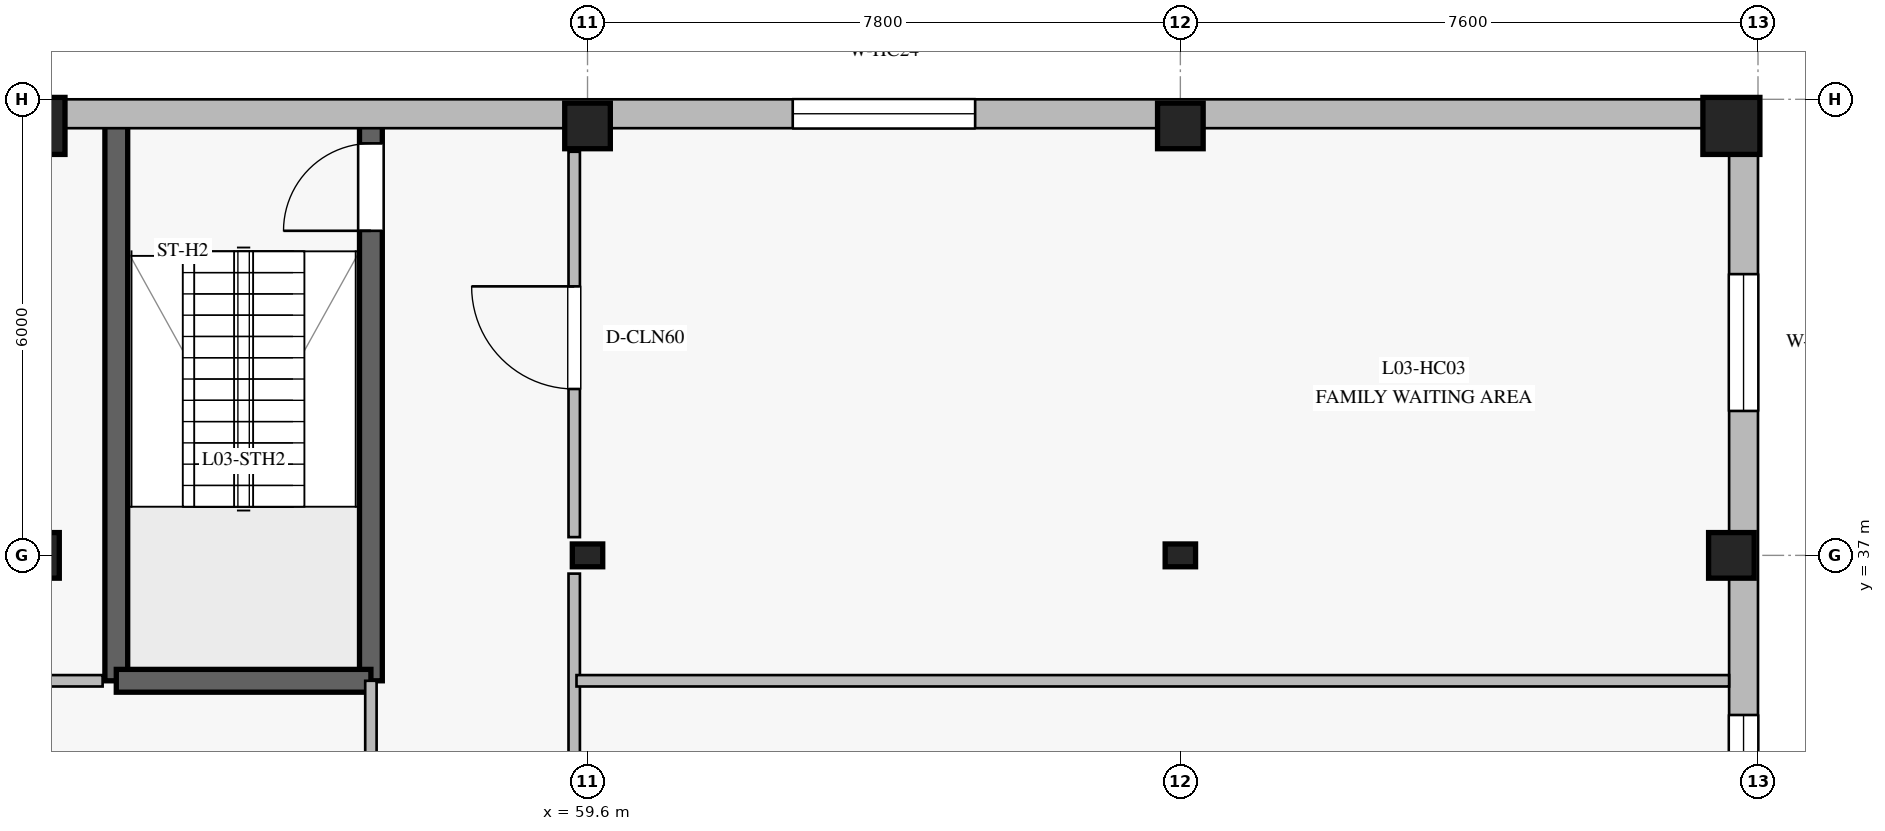
"""IFC4 building model, lengths in metres.
Left out: names, types, materials, properties, quantities, classifications, styles, units other than length and angle.
Written with IfcOpenShell. Run it as: python <this file> out.ifc"""

import sys

from ifc_helpers import new_model, si_unit, direction, frame, frame_2d, origin, origin_2d, place, context, subcontext, project, spatial, rectangle, i_section, extrude, element, fill, save


model = new_model("IFC4")
c1 = context("Model", 3, precision=1e-05, world=origin(), true_north=direction((0.0, 1.0)))
c2 = subcontext(c1, "Body", "Model", "MODEL_VIEW")
j1 = project(units=[si_unit("LENGTHUNIT", "METRE"), si_unit("PLANEANGLEUNIT", "RADIAN")], contexts=[c1])
p1 = place(None, origin())
s1 = spatial("IfcSite", under=j1, at=p1, CompositionType="ELEMENT")
p2 = place(p1, origin())
s2 = spatial("IfcBuilding", under=s1, at=p2, CompositionType="ELEMENT")
p3 = place(p2, frame((0.0, 0.0, 14.4)))
s3 = spatial("IfcBuildingStorey", under=s2, at=p3, CompositionType="ELEMENT", Elevation=14.4)
p4 = place(p3, frame((56.75, 35.35, 0.0), z_axis=(0.0, 0.0, 1.0), x_axis=(0.0, 1.0, 0.0)))
e1 = element("IfcWall", 1, at=p4, inside=s3, PredefinedType="SOLIDWALL", context=c2, shape_type="SweptSolid", body=[
    extrude(rectangle(XDim=7.3, YDim=0.3, at=frame_2d((3.65, 0.0))), origin(), (0.0, 0.0, 1.0), 4.3),
])
p5 = place(p4, frame((5.92, 0.0, 0.0)))
e2 = element("IfcOpeningElement", 2, at=p5, cuts=e1, PredefinedType="OPENING", context=c2, shape_type="SweptSolid", body=[
    extrude(rectangle(XDim=1.15, YDim=2.2, at=frame_2d((0.575, 1.1))), frame((0.0, 0.16, 0.0), z_axis=(0.0, -1.0, 0.0), x_axis=(1.0, 0.0, 0.0)), (0.0, 0.0, 1.0), 0.32),
])
p6 = place(p3, frame((53.4, 35.35, 0.0), z_axis=(0.0, 0.0, 1.0), x_axis=(0.0, 1.0, 0.0)))
e3 = element("IfcWall", 3, at=p6, inside=s3, PredefinedType="SOLIDWALL", context=c2, shape_type="SweptSolid", body=[
    extrude(rectangle(XDim=7.3, YDim=0.3, at=frame_2d((3.65, 0.0))), origin(), (0.0, 0.0, 1.0), 4.3),
])
p7 = place(p3, frame((53.4, 35.35, 0.0), z_axis=(0.0, 0.0, 1.0), x_axis=(1.0, 0.0, 0.0)))
e4 = element("IfcWall", 4, at=p7, inside=s3, PredefinedType="SOLIDWALL", context=c2, shape_type="SweptSolid", body=[
    extrude(rectangle(XDim=3.35, YDim=0.3, at=frame_2d((1.675, 0.0))), origin(), (0.0, 0.0, 1.0), 4.3),
])
p8 = place(p3, frame((52.35, 37.0, 0.0), z_axis=(0.0, 0.0, 1.0), x_axis=(1.0, 0.0, 0.0)))
e5 = element("IfcColumn", 5, at=p8, inside=s3, PredefinedType="COLUMN", context=c2, shape_type="SweptSolid", body=[
    extrude(rectangle(XDim=0.6, YDim=0.6, at=origin_2d()), origin(), (0.0, 0.0, 1.0), 4.6),
])
p9 = place(p3, frame((52.35, 42.65, 0.0), z_axis=(0.0, 0.0, 1.0), x_axis=(1.0, 0.0, 0.0)))
e6 = element("IfcColumn", 6, at=p9, inside=s3, PredefinedType="COLUMN", context=c2, shape_type="SweptSolid", body=[
    extrude(rectangle(XDim=0.75, YDim=0.75, at=origin_2d()), origin(), (0.0, 0.0, 1.0), 4.6),
])
p10 = place(p3, frame((59.6, 37.0, 0.0), z_axis=(0.0, 0.0, 1.0), x_axis=(1.0, 0.0, 0.0)))
e7 = element("IfcColumn", 7, at=p10, inside=s3, PredefinedType="COLUMN", context=c2, shape_type="SweptSolid", body=[
    extrude(i_section(OverallWidth=0.3, OverallDepth=0.4, WebThickness=0.013, FlangeThickness=0.024, at=origin_2d()), origin(), (0.0, 0.0, 1.0), 4.6),
])
p11 = place(p3, frame((59.6, 42.65, 0.0), z_axis=(0.0, 0.0, 1.0), x_axis=(1.0, 0.0, 0.0)))
e8 = element("IfcColumn", 8, at=p11, inside=s3, PredefinedType="COLUMN", context=c2, shape_type="SweptSolid", body=[
    extrude(rectangle(XDim=0.6, YDim=0.6, at=origin_2d()), origin(), (0.0, 0.0, 1.0), 4.6),
])
p12 = place(p3, frame((67.4, 37.0, 0.0), z_axis=(0.0, 0.0, 1.0), x_axis=(1.0, 0.0, 0.0)))
e9 = element("IfcColumn", 9, at=p12, inside=s3, PredefinedType="COLUMN", context=c2, shape_type="SweptSolid", body=[
    extrude(i_section(OverallWidth=0.3, OverallDepth=0.4, WebThickness=0.013, FlangeThickness=0.024, at=origin_2d()), origin(), (0.0, 0.0, 1.0), 4.6),
])
for number, where, z_axis, x_axis in (
    (10, (67.4, 42.65, 0.0), (0.0, 0.0, 1.0), (1.0, 0.0, 0.0)),
    (11, (74.65, 37.0, 0.0), (0.0, 0.0, 1.0), (1.0, 0.0, 0.0)),
):
    element("IfcColumn", number, at=place(p3, frame(where, z_axis=z_axis, x_axis=x_axis)), inside=s3, PredefinedType="COLUMN", context=c2, shape_type="SweptSolid", body=[
        extrude(rectangle(XDim=0.6, YDim=0.6, at=origin_2d()), origin(), (0.0, 0.0, 1.0), 4.6),
    ])
p13 = place(p3, frame((74.65, 42.65, 0.0), z_axis=(0.0, 0.0, 1.0), x_axis=(1.0, 0.0, 0.0)))
e12 = element("IfcColumn", 12, at=p13, inside=s3, PredefinedType="COLUMN", context=c2, shape_type="SweptSolid", body=[
    extrude(rectangle(XDim=0.75, YDim=0.75, at=origin_2d()), origin(), (0.0, 0.0, 1.0), 4.6),
])
p14 = place(p3, frame((52.0, 42.81, 0.0), z_axis=(0.0, 0.0, 1.0), x_axis=(1.0, 0.0, 0.0)))
e13 = element("IfcWall", 13, at=p14, inside=s3, PredefinedType="STANDARD", context=c2, shape_type="SweptSolid", body=[
    extrude(rectangle(XDim=23.0, YDim=0.38, at=frame_2d((11.5, 0.0))), origin(), (0.0, 0.0, 1.0), 4.3),
])
p15 = place(p14, frame((10.3, 0.0, 0.95)))
e14 = element("IfcOpeningElement", 14, at=p15, cuts=e13, PredefinedType="OPENING", context=c2, shape_type="SweptSolid", body=[
    extrude(rectangle(XDim=2.4, YDim=1.8, at=frame_2d((1.2, 0.9))), frame((0.0, 0.2, 0.0), z_axis=(0.0, -1.0, 0.0), x_axis=(1.0, 0.0, 0.0)), (0.0, 0.0, 1.0), 0.4),
])
p16 = place(p3, frame((74.81, 42.62, 0.0), z_axis=(0.0, 0.0, 1.0), x_axis=(0.0, -1.0, 0.0)))
e15 = element("IfcWall", 15, at=p16, inside=s3, PredefinedType="STANDARD", context=c2, shape_type="SweptSolid", body=[
    extrude(rectangle(XDim=35.24, YDim=0.38, at=frame_2d((17.62, 0.0))), origin(), (0.0, 0.0, 1.0), 4.3),
])
p17 = place(p16, frame((31.52, 0.0, 0.9)))
e16 = element("IfcOpeningElement", 16, at=p17, cuts=e15, PredefinedType="OPENING", context=c2, shape_type="SweptSolid", body=[
    extrude(rectangle(XDim=1.8, YDim=1.8, at=frame_2d((0.9, 0.9))), frame((0.0, 0.2, 0.0), z_axis=(0.0, -1.0, 0.0), x_axis=(1.0, 0.0, 0.0)), (0.0, 0.0, 1.0), 0.4),
])
p18 = place(p16, frame((25.72, 0.0, 0.9)))
e17 = element("IfcOpeningElement", 17, at=p18, cuts=e15, PredefinedType="OPENING", context=c2, shape_type="SweptSolid", body=[
    extrude(rectangle(XDim=1.8, YDim=1.8, at=frame_2d((0.9, 0.9))), frame((0.0, 0.2, 0.0), z_axis=(0.0, -1.0, 0.0), x_axis=(1.0, 0.0, 0.0)), (0.0, 0.0, 1.0), 0.4),
])
p19 = place(p16, frame((19.72, 0.0, 0.9)))
e18 = element("IfcOpeningElement", 18, at=p19, cuts=e15, PredefinedType="OPENING", context=c2, shape_type="SweptSolid", body=[
    extrude(rectangle(XDim=1.8, YDim=1.8, at=frame_2d((0.9, 0.9))), frame((0.0, 0.2, 0.0), z_axis=(0.0, -1.0, 0.0), x_axis=(1.0, 0.0, 0.0)), (0.0, 0.0, 1.0), 0.4),
])
p20 = place(p16, frame((13.72, 0.0, 0.9)))
e19 = element("IfcOpeningElement", 19, at=p20, cuts=e15, PredefinedType="OPENING", context=c2, shape_type="SweptSolid", body=[
    extrude(rectangle(XDim=1.8, YDim=1.8, at=frame_2d((0.9, 0.9))), frame((0.0, 0.2, 0.0), z_axis=(0.0, -1.0, 0.0), x_axis=(1.0, 0.0, 0.0)), (0.0, 0.0, 1.0), 0.4),
])
p21 = place(p16, frame((7.72, 0.0, 0.9)))
e20 = element("IfcOpeningElement", 20, at=p21, cuts=e15, PredefinedType="OPENING", context=c2, shape_type="SweptSolid", body=[
    extrude(rectangle(XDim=1.8, YDim=1.8, at=frame_2d((0.9, 0.9))), frame((0.0, 0.2, 0.0), z_axis=(0.0, -1.0, 0.0), x_axis=(1.0, 0.0, 0.0)), (0.0, 0.0, 1.0), 0.4),
])
p22 = place(p16, frame((1.92, 0.0, 0.9)))
e21 = element("IfcOpeningElement", 21, at=p22, cuts=e15, PredefinedType="OPENING", context=c2, shape_type="SweptSolid", body=[
    extrude(rectangle(XDim=1.8, YDim=1.8, at=frame_2d((0.9, 0.9))), frame((0.0, 0.2, 0.0), z_axis=(0.0, -1.0, 0.0), x_axis=(1.0, 0.0, 0.0)), (0.0, 0.0, 1.0), 0.4),
])
p23 = place(p3, frame((56.75, 14.65, 0.0), z_axis=(0.0, 0.0, 1.0), x_axis=(0.0, 1.0, 0.0)))
e22 = element("IfcWall", 22, at=p23, inside=s3, PredefinedType="PARTITIONING", context=c2, shape_type="SweptSolid", body=[
    extrude(rectangle(XDim=20.7, YDim=0.15, at=frame_2d((10.35, 0.0))), origin(), (0.0, 0.0, 1.0), 4.3),
])
p24 = place(p23, frame((9.675, 0.0, 0.0)))
e23 = element("IfcOpeningElement", 23, at=p24, cuts=e22, PredefinedType="OPENING", context=c2, shape_type="SweptSolid", body=[
    extrude(rectangle(XDim=1.35, YDim=2.2, at=frame_2d((0.675, 1.1))), frame((0.0, 0.085, 0.0), z_axis=(0.0, -1.0, 0.0), x_axis=(1.0, 0.0, 0.0)), (0.0, 0.0, 1.0), 0.17),
])
p25 = place(p3, frame((59.425, 31.24, 0.0), z_axis=(0.0, 0.0, 1.0), x_axis=(0.0, 1.0, 0.0)))
e24 = element("IfcWall", 24, at=p25, inside=s3, PredefinedType="PARTITIONING", context=c2, shape_type="SweptSolid", body=[
    extrude(rectangle(XDim=5.52, YDim=0.15, at=frame_2d((2.76, 0.0))), origin(), (0.0, 0.0, 1.0), 3.94),
])
p26 = place(p3, frame((59.425, 37.24, 0.0), z_axis=(0.0, 0.0, 1.0), x_axis=(0.0, 1.0, 0.0)))
e25 = element("IfcWall", 25, at=p26, inside=s3, PredefinedType="PARTITIONING", context=c2, shape_type="SweptSolid", body=[
    extrude(rectangle(XDim=5.07, YDim=0.15, at=frame_2d((2.535, 0.0))), origin(), (0.0, 0.0, 1.0), 3.94),
])
p27 = place(p26, frame((1.949, 0.0, 0.0)))
e26 = element("IfcOpeningElement", 26, at=p27, cuts=e25, PredefinedType="OPENING", context=c2, shape_type="SweptSolid", body=[
    extrude(rectangle(XDim=1.35, YDim=2.2, at=frame_2d((0.675, 1.1))), frame((0.0, 0.085, 0.0), z_axis=(0.0, -1.0, 0.0), x_axis=(1.0, 0.0, 0.0)), (0.0, 0.0, 1.0), 0.17),
])
p28 = place(p3, frame((52.38, 35.35, 0.0), z_axis=(0.0, 0.0, 1.0), x_axis=(1.0, 0.0, 0.0)))
e27 = element("IfcWall", 27, at=p28, inside=s3, PredefinedType="PARTITIONING", context=c2, shape_type="SweptSolid", body=[
    extrude(rectangle(XDim=0.84, YDim=0.15, at=frame_2d((0.42, 0.0))), origin(), (0.0, 0.0, 1.0), 3.94),
])
p29 = place(p3, frame((59.455, 35.35, 0.0), z_axis=(0.0, 0.0, 1.0), x_axis=(1.0, 0.0, 0.0)))
e28 = element("IfcWall", 28, at=p29, inside=s3, PredefinedType="PARTITIONING", context=c2, shape_type="SweptSolid", body=[
    extrude(rectangle(XDim=15.165, YDim=0.15, at=frame_2d((7.583, 0.0))), origin(), (0.0, 0.0, 1.0), 3.94),
])
p30 = place(p21, origin())
e29 = element("IfcWindow", 29, at=p30, inside=s3, PartitioningType="DOUBLE_PANEL_VERTICAL", PredefinedType="WINDOW", context=c2, shape_type="SweptSolid", body=[
    extrude(rectangle(XDim=1.8, YDim=1.8, at=frame_2d((0.9, 0.9))), frame((0.0, 0.03, 0.0), z_axis=(0.0, -1.0, 0.0), x_axis=(1.0, 0.0, 0.0)), (0.0, 0.0, 1.0), 0.06),
])
fill(e20, e29)
p31 = place(p22, origin())
e30 = element("IfcWindow", 30, at=p31, inside=s3, PartitioningType="DOUBLE_PANEL_VERTICAL", PredefinedType="WINDOW", context=c2, shape_type="SweptSolid", body=[
    extrude(rectangle(XDim=1.8, YDim=1.8, at=frame_2d((0.9, 0.9))), frame((0.0, 0.03, 0.0), z_axis=(0.0, -1.0, 0.0), x_axis=(1.0, 0.0, 0.0)), (0.0, 0.0, 1.0), 0.06),
])
fill(e21, e30)
p32 = place(p15, origin())
e31 = element("IfcWindow", 31, at=p32, inside=s3, PartitioningType="TRIPLE_PANEL_VERTICAL", PredefinedType="WINDOW", context=c2, shape_type="SweptSolid", body=[
    extrude(rectangle(XDim=2.4, YDim=1.8, at=frame_2d((1.2, 0.9))), frame((0.0, 0.03, 0.0), z_axis=(0.0, -1.0, 0.0), x_axis=(1.0, 0.0, 0.0)), (0.0, 0.0, 1.0), 0.06),
])
fill(e14, e31)
p33 = place(p5, origin())
e32 = element("IfcDoor", 32, at=p33, inside=s3, OperationType="SINGLE_SWING_LEFT", PredefinedType="DOOR", context=c2, shape_type="SweptSolid", body=[
    extrude(rectangle(XDim=1.15, YDim=2.2, at=frame_2d((0.575, 1.1))), frame((0.0, 0.025, 0.0), z_axis=(0.0, -1.0, 0.0), x_axis=(1.0, 0.0, 0.0)), (0.0, 0.0, 1.0), 0.05),
])
fill(e2, e32)
p34 = place(p27, origin())
e33 = element("IfcDoor", 33, at=p34, inside=s3, OperationType="SINGLE_SWING_RIGHT", PredefinedType="DOOR", context=c2, shape_type="SweptSolid", body=[
    extrude(rectangle(XDim=1.35, YDim=2.2, at=frame_2d((0.675, 1.1))), frame((0.0, 0.025, 0.0), z_axis=(0.0, -1.0, 0.0), x_axis=(1.0, 0.0, 0.0)), (0.0, 0.0, 1.0), 0.05),
])
fill(e26, e33)
save(model, sys.argv[1])
